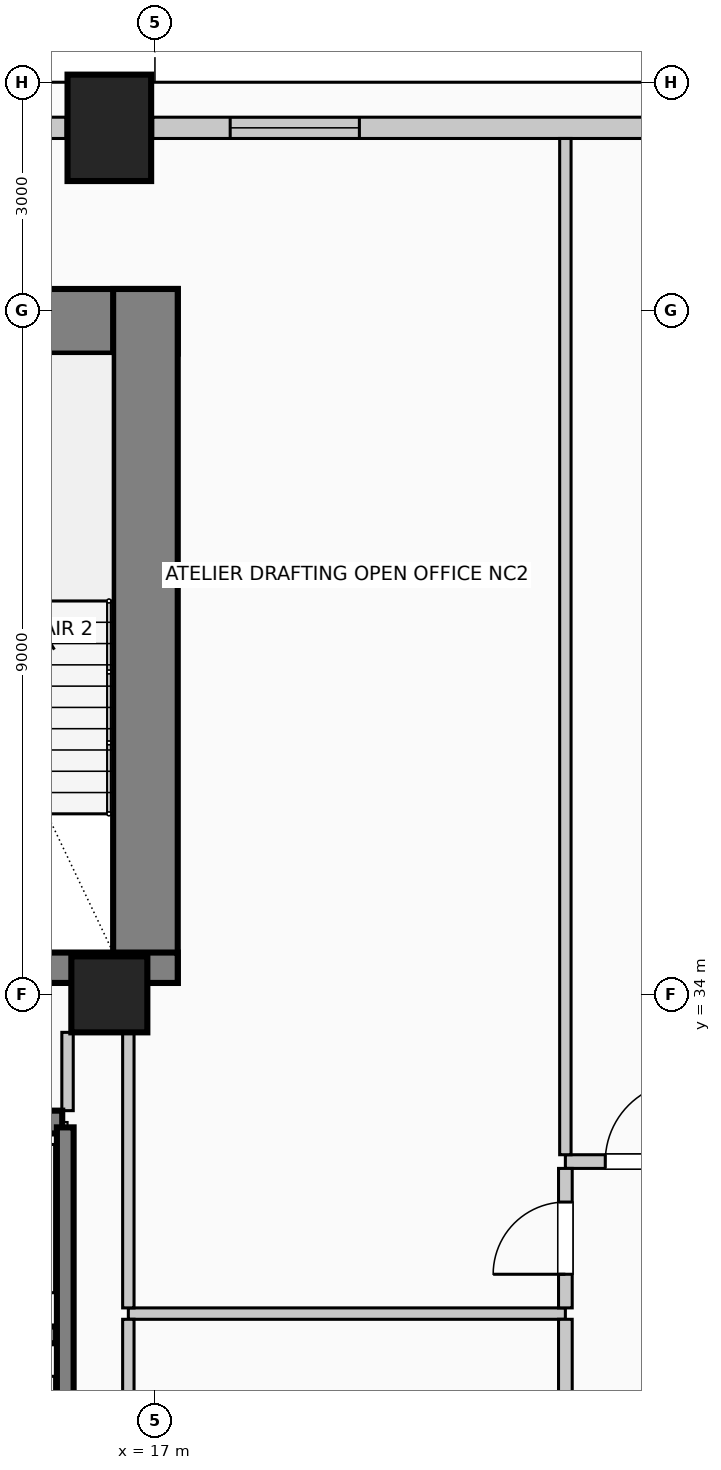
"""IFC4 building model, lengths in metres.
Left out: names, types, materials, properties, quantities, classifications, styles, units other than length and angle.
Written with IfcOpenShell. Run it as: python <this file> out.ifc"""

import sys

from ifc_helpers import new_model, si_unit, direction, frame, frame_2d, origin, origin_2d, place, context, subcontext, project, spatial, rectangle, circle, extrude, element, fill, save


model = new_model("IFC4")
c1 = context("Model", 3, precision=1e-05, world=origin(), true_north=direction((0.0, 1.0)))
c2 = subcontext(c1, "Body", "Model", "MODEL_VIEW")
j1 = project(units=[si_unit("LENGTHUNIT", "METRE"), si_unit("PLANEANGLEUNIT", "RADIAN")], contexts=[c1])
p1 = place(None, origin())
s1 = spatial("IfcSite", under=j1, at=p1, CompositionType="ELEMENT")
p2 = place(p1, origin())
s2 = spatial("IfcBuilding", under=s1, at=p2, CompositionType="ELEMENT")
p3 = place(p2, frame((0.0, 0.0, 136.6)))
s3 = spatial("IfcBuildingStorey", under=s2, at=p3, CompositionType="ELEMENT", Elevation=136.6)
p4 = place(p3, frame((2.7, 42.855, 0.0), z_axis=(0.0, 0.0, 1.0), x_axis=(1.0, 0.0, 0.0)))
e1 = element("IfcWall", 1, at=p4, inside=s3, PredefinedType="SHEAR", context=c2, shape_type="SweptSolid", body=[
    extrude(rectangle(XDim=14.6, YDim=0.85, at=frame_2d((7.3, 0.0))), origin(), (0.0, 0.0, 1.0), 4.0),
])
p5 = place(p3, frame((16.875, 34.15, 0.0), z_axis=(0.0, 0.0, 1.0), x_axis=(0.0, 1.0, 0.0)))
e2 = element("IfcWall", 2, at=p5, inside=s3, PredefinedType="SHEAR", context=c2, shape_type="SweptSolid", body=[
    extrude(rectangle(XDim=9.13, YDim=0.85, at=frame_2d((4.565, 0.0))), origin(), (0.0, 0.0, 1.0), 4.0),
])
p6 = place(p3, frame((12.29, 34.35, 0.0), z_axis=(0.0, 0.0, 1.0), x_axis=(1.0, 0.0, 0.0)))
e3 = element("IfcWall", 3, at=p6, inside=s3, PredefinedType="SHEAR", context=c2, shape_type="SweptSolid", body=[
    extrude(rectangle(XDim=5.01, YDim=0.4, at=frame_2d((2.505, 0.0))), origin(), (0.0, 0.0, 1.0), 4.0),
])
p7 = place(p6, frame((1.4, 0.0, 0.0)))
e4 = element("IfcOpeningElement", 4, at=p7, cuts=e3, PredefinedType="OPENING", context=c2, shape_type="SweptSolid", body=[
    extrude(rectangle(XDim=1.15, YDim=2.2, at=frame_2d((0.575, 1.1))), frame((0.0, 0.21, 0.0), z_axis=(0.0, -1.0, 0.0), x_axis=(1.0, 0.0, 0.0)), (0.0, 0.0, 1.0), 0.42),
])
p8 = place(p3, frame((16.4, 45.4, 0.0), z_axis=(0.0, 0.0, 1.0), x_axis=(1.0, 0.0, 0.0)))
e5 = element("IfcColumn", 5, at=p8, inside=s3, PredefinedType="COLUMN", context=c2, shape_type="SweptSolid", body=[
    extrude(rectangle(XDim=1.1, YDim=1.4, at=origin_2d()), origin(), (0.0, 0.0, 1.0), 4.0),
])
p9 = place(p3, frame((16.4, 34.0, 0.0), z_axis=(0.0, 0.0, 1.0), x_axis=(1.0, 0.0, 0.0)))
e6 = element("IfcColumn", 6, at=p9, inside=s3, PredefinedType="COLUMN", context=c2, shape_type="SweptSolid", body=[
    extrude(circle(Radius=0.5, at=origin_2d()), origin(), (0.0, 0.0, 1.0), 4.0),
])
p10 = place(p3, frame((14.445, 45.4, 0.0), z_axis=(0.0, 0.0, 1.0), x_axis=(1.0, 0.0, 0.0)))
e7 = element("IfcWall", 7, at=p10, inside=s3, PredefinedType="SOLIDWALL", context=c2, shape_type="SweptSolid", body=[
    extrude(rectangle(XDim=1.385, YDim=0.28, at=frame_2d((0.692, 0.0))), origin(), (0.0, 0.0, 1.0), 2.875),
])
p11 = place(p3, frame((16.97, 45.4, 0.0), z_axis=(0.0, 0.0, 1.0), x_axis=(1.0, 0.0, 0.0)))
e8 = element("IfcWall", 8, at=p11, inside=s3, PredefinedType="SOLIDWALL", context=c2, shape_type="SweptSolid", body=[
    extrude(rectangle(XDim=6.46, YDim=0.28, at=frame_2d((3.23, 0.0))), origin(), (0.0, 0.0, 1.0), 2.875),
])
p12 = place(p11, frame((1.02, 0.0, 0.5)))
e9 = element("IfcOpeningElement", 9, at=p12, cuts=e8, PredefinedType="OPENING", context=c2, shape_type="SweptSolid", body=[
    extrude(rectangle(XDim=1.7, YDim=1.95, at=frame_2d((0.85, 0.975))), frame((0.0, 0.15, 0.0), z_axis=(0.0, -1.0, 0.0), x_axis=(1.0, 0.0, 0.0)), (0.0, 0.0, 1.0), 0.3),
])
p13 = place(p3, frame((14.0, 32.32, 0.0), z_axis=(0.0, 0.0, 1.0), x_axis=(1.0, 0.0, 0.0)))
e10 = element("IfcWall", 10, at=p13, inside=s3, PredefinedType="SOLIDWALL", context=c2, shape_type="SweptSolid", body=[
    extrude(rectangle(XDim=1.78, YDim=0.3, at=frame_2d((0.89, 0.0))), origin(), (0.0, 0.0, 1.0), 4.0),
])
p14 = place(p13, frame((0.34, 0.0, 0.0)))
e11 = element("IfcOpeningElement", 11, at=p14, cuts=e10, PredefinedType="OPENING", context=c2, shape_type="SweptSolid", body=[
    extrude(rectangle(XDim=1.1, YDim=2.2, at=frame_2d((0.55, 1.1))), frame((0.0, 0.16, 0.0), z_axis=(0.0, -1.0, 0.0), x_axis=(1.0, 0.0, 0.0)), (0.0, 0.0, 1.0), 0.32),
])
p15 = place(p3, frame((15.82, 26.8, 0.0), z_axis=(0.0, 0.0, 1.0), x_axis=(0.0, 1.0, 0.0)))
e12 = element("IfcWall", 12, at=p15, inside=s3, PredefinedType="SOLIDWALL", context=c2, shape_type="SweptSolid", body=[
    extrude(rectangle(XDim=5.45, YDim=0.22, at=frame_2d((2.725, 0.0))), origin(), (0.0, 0.0, 1.0), 4.0),
])
p16 = place(p3, frame((12.3, 29.52, 0.0), z_axis=(0.0, 0.0, 1.0), x_axis=(1.0, 0.0, 0.0)))
e13 = element("IfcWall", 13, at=p16, inside=s3, PredefinedType="SOLIDWALL", context=c2, shape_type="SweptSolid", body=[
    extrude(rectangle(XDim=3.4, YDim=0.22, at=frame_2d((1.7, 0.0))), origin(), (0.0, 0.0, 1.0), 4.0),
])
p17 = place(p3, frame((16.65, 29.8, 0.0), z_axis=(0.0, 0.0, 1.0), x_axis=(1.0, 0.0, 0.0)))
e14 = element("IfcWall", 14, at=p17, inside=s3, PredefinedType="PARTITIONING", context=c2, shape_type="SweptSolid", body=[
    extrude(rectangle(XDim=5.75, YDim=0.15, at=frame_2d((2.875, 0.0))), origin(), (0.0, 0.0, 1.0), 3.725),
])
p18 = place(p3, frame((22.4, 31.8, 0.0), z_axis=(0.0, 0.0, 1.0), x_axis=(1.0, 0.0, 0.0)))
e15 = element("IfcWall", 15, at=p18, inside=s3, PredefinedType="PARTITIONING", context=c2, shape_type="SweptSolid", body=[
    extrude(rectangle(XDim=2.1, YDim=0.18, at=frame_2d((1.05, 0.0))), origin(), (0.0, 0.0, 1.0), 3.725),
])
p19 = place(p18, frame((0.525, 0.0, 0.0)))
e16 = element("IfcOpeningElement", 16, at=p19, cuts=e15, PredefinedType="OPENING", context=c2, shape_type="SweptSolid", body=[
    extrude(rectangle(XDim=1.05, YDim=2.15, at=frame_2d((0.525, 1.075))), frame((0.0, 0.1, 0.0), z_axis=(0.0, -1.0, 0.0), x_axis=(1.0, 0.0, 0.0)), (0.0, 0.0, 1.0), 0.2),
])
p20 = place(p3, frame((15.85, 32.47, 0.0), z_axis=(0.0, 0.0, 1.0), x_axis=(0.0, 1.0, 0.0)))
e17 = element("IfcWall", 17, at=p20, inside=s3, PredefinedType="PARTITIONING", context=c2, shape_type="SweptSolid", body=[
    extrude(rectangle(XDim=1.03, YDim=0.15, at=frame_2d((0.515, 0.0))), origin(), (0.0, 0.0, 1.0), 3.725),
])
p21 = place(p3, frame((16.65, 18.5, 0.0), z_axis=(0.0, 0.0, 1.0), x_axis=(0.0, 1.0, 0.0)))
e18 = element("IfcWall", 18, at=p21, inside=s3, PredefinedType="PARTITIONING", context=c2, shape_type="SweptSolid", body=[
    extrude(rectangle(XDim=11.225, YDim=0.15, at=frame_2d((5.613, 0.0))), origin(), (0.0, 0.0, 1.0), 3.07),
])
p22 = place(p3, frame((16.65, 29.875, 0.0), z_axis=(0.0, 0.0, 1.0), x_axis=(0.0, 1.0, 0.0)))
e19 = element("IfcWall", 19, at=p22, inside=s3, PredefinedType="PARTITIONING", context=c2, shape_type="SweptSolid", body=[
    extrude(rectangle(XDim=3.625, YDim=0.15, at=frame_2d((1.812, 0.0))), origin(), (0.0, 0.0, 1.0), 3.07),
])
p23 = place(p3, frame((22.4, 15.74, 0.0), z_axis=(0.0, 0.0, 1.0), x_axis=(0.0, 1.0, 0.0)))
e20 = element("IfcWall", 20, at=p23, inside=s3, PredefinedType="PARTITIONING", context=c2, shape_type="SweptSolid", body=[
    extrude(rectangle(XDim=13.985, YDim=0.18, at=frame_2d((6.993, 0.0))), origin(), (0.0, 0.0, 1.0), 3.725),
])
p24 = place(p3, frame((22.4, 29.875, 0.0), z_axis=(0.0, 0.0, 1.0), x_axis=(0.0, 1.0, 0.0)))
e21 = element("IfcWall", 21, at=p24, inside=s3, PredefinedType="PARTITIONING", context=c2, shape_type="SweptSolid", body=[
    extrude(rectangle(XDim=1.835, YDim=0.18, at=frame_2d((0.917, 0.0))), origin(), (0.0, 0.0, 1.0), 3.725),
])
p25 = place(p24, frame((0.442, 0.0, 0.0)))
e22 = element("IfcOpeningElement", 22, at=p25, cuts=e21, PredefinedType="OPENING", context=c2, shape_type="SweptSolid", body=[
    extrude(rectangle(XDim=0.95, YDim=2.15, at=frame_2d((0.475, 1.075))), frame((0.0, 0.1, 0.0), z_axis=(0.0, -1.0, 0.0), x_axis=(1.0, 0.0, 0.0)), (0.0, 0.0, 1.0), 0.2),
])
p26 = place(p3, frame((22.4, 31.89, 0.0), z_axis=(0.0, 0.0, 1.0), x_axis=(0.0, 1.0, 0.0)))
e23 = element("IfcWall", 23, at=p26, inside=s3, PredefinedType="PARTITIONING", context=c2, shape_type="SweptSolid", body=[
    extrude(rectangle(XDim=13.37, YDim=0.15, at=frame_2d((6.685, 0.0))), origin(), (0.0, 0.0, 1.0), 3.725),
])
p27 = place(p12, origin())
e24 = element("IfcWindow", 24, at=p27, inside=s3, PartitioningType="SINGLE_PANEL", PredefinedType="WINDOW", context=c2, shape_type="SweptSolid", body=[
    extrude(rectangle(XDim=1.7, YDim=1.95, at=frame_2d((0.85, 0.975))), frame((0.0, 0.03, 0.0), z_axis=(0.0, -1.0, 0.0), x_axis=(1.0, 0.0, 0.0)), (0.0, 0.0, 1.0), 0.06),
])
fill(e9, e24)
p28 = place(p19, origin())
e25 = element("IfcDoor", 25, at=p28, inside=s3, OperationType="SINGLE_SWING_RIGHT", PredefinedType="DOOR", context=c2, shape_type="SweptSolid", body=[
    extrude(rectangle(XDim=1.05, YDim=2.15, at=frame_2d((0.525, 1.075))), frame((0.0, 0.025, 0.0), z_axis=(0.0, -1.0, 0.0), x_axis=(1.0, 0.0, 0.0)), (0.0, 0.0, 1.0), 0.05),
])
fill(e16, e25)
p29 = place(p25, origin())
e26 = element("IfcDoor", 26, at=p29, inside=s3, OperationType="SINGLE_SWING_LEFT", PredefinedType="DOOR", context=c2, shape_type="SweptSolid", body=[
    extrude(rectangle(XDim=0.95, YDim=2.15, at=frame_2d((0.475, 1.075))), frame((0.0, 0.025, 0.0), z_axis=(0.0, -1.0, 0.0), x_axis=(1.0, 0.0, 0.0)), (0.0, 0.0, 1.0), 0.05),
])
fill(e22, e26)
save(model, sys.argv[1])
